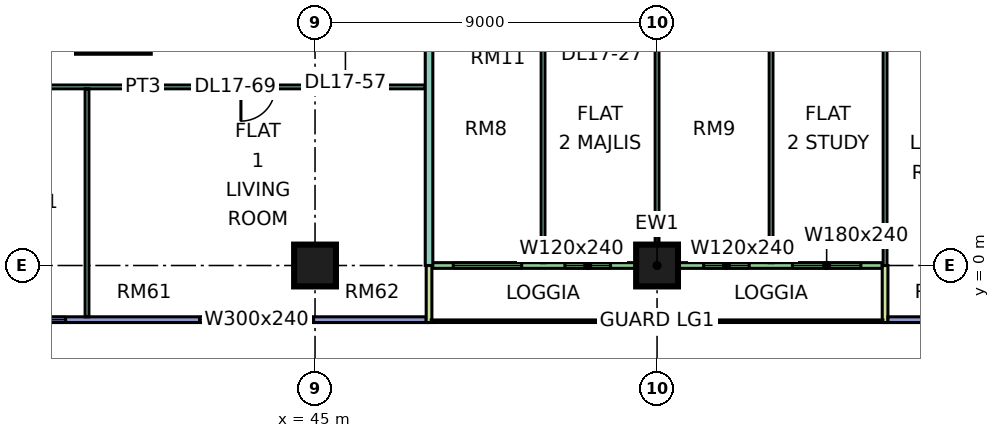
"""IFC4 building model, lengths in metres.
Left out: names, types, materials, properties, quantities, classifications, styles, units other than length and angle.
Written with IfcOpenShell. Run it as: python <this file> out.ifc"""

import sys

from ifc_helpers import new_model, si_unit, direction, frame, frame_2d, origin, origin_2d, place, context, subcontext, project, spatial, rectangle, extrude, element, fill, save


model = new_model("IFC4")
c1 = context("Model", 3, precision=1e-05, world=origin(), true_north=direction((0.0, 1.0)))
c2 = subcontext(c1, "Body", "Model", "MODEL_VIEW")
j1 = project(units=[si_unit("LENGTHUNIT", "METRE"), si_unit("PLANEANGLEUNIT", "RADIAN")], contexts=[c1])
p1 = place(None, origin())
s1 = spatial("IfcSite", under=j1, at=p1, CompositionType="ELEMENT")
p2 = place(p1, origin())
s2 = spatial("IfcBuilding", under=s1, at=p2, CompositionType="ELEMENT")
p3 = place(p2, frame((0.0, 0.0, 78.9)))
s3 = spatial("IfcBuildingStorey", under=s2, at=p3, CompositionType="ELEMENT", Elevation=78.9)
for number, where, z_axis, x_axis in (
    (1, (45.0, 0.0, 0.0), (0.0, 0.0, 1.0), (1.0, 0.0, 0.0)),
    (2, (54.0, 0.0, 0.0), (0.0, 0.0, 1.0), (1.0, 0.0, 0.0)),
):
    element("IfcColumn", number, at=place(p3, frame(where, z_axis=z_axis, x_axis=x_axis)), inside=s3, PredefinedType="COLUMN", context=c2, shape_type="SweptSolid", body=[
        extrude(rectangle(XDim=1.1, YDim=1.1, at=origin_2d()), origin(), (0.0, 0.0, 1.0), 3.75),
    ])
p4 = place(p3, frame((37.2, 5.725, 0.0), z_axis=(0.0, 0.0, 1.0), x_axis=(1.0, 0.0, 0.0)))
e3 = element("IfcWall", 3, at=p4, inside=s3, PredefinedType="SHEAR", context=c2, shape_type="SweptSolid", body=[
    extrude(rectangle(XDim=3.45, YDim=0.25, at=frame_2d((1.725, 0.0))), origin(), (0.0, 0.0, 1.0), 3.75),
])
p5 = place(p3, frame((36.075, -1.425, 0.0), z_axis=(0.0, 0.0, 1.0), x_axis=(1.0, 0.0, 0.0)))
e4 = element("IfcWall", 4, at=p5, inside=s3, PredefinedType="SOLIDWALL", context=c2, shape_type="SweptSolid", body=[
    extrude(rectangle(XDim=11.85, YDim=0.15, at=frame_2d((5.925, 0.0))), origin(), (0.0, 0.0, 1.0), 3.35),
])
p6 = place(p5, frame((0.562, 0.0, 0.45)))
e5 = element("IfcOpeningElement", 5, at=p6, cuts=e4, PredefinedType="OPENING", context=c2, shape_type="SweptSolid", body=[
    extrude(rectangle(XDim=1.8, YDim=2.4, at=frame_2d((0.9, 1.2))), frame((0.0, 0.085, 0.0), z_axis=(0.0, -1.0, 0.0), x_axis=(1.0, 0.0, 0.0)), (0.0, 0.0, 1.0), 0.17),
])
p7 = place(p5, frame((5.887, 0.0, 0.45)))
e6 = element("IfcOpeningElement", 6, at=p7, cuts=e4, PredefinedType="OPENING", context=c2, shape_type="SweptSolid", body=[
    extrude(rectangle(XDim=3.0, YDim=2.4, at=frame_2d((1.5, 1.2))), frame((0.0, 0.085, 0.0), z_axis=(0.0, -1.0, 0.0), x_axis=(1.0, 0.0, 0.0)), (0.0, 0.0, 1.0), 0.17),
])
p8 = place(p3, frame((48.075, 0.0, 0.0), z_axis=(0.0, 0.0, 1.0), x_axis=(1.0, 0.0, 0.0)))
e7 = element("IfcWall", 7, at=p8, inside=s3, PredefinedType="SOLIDWALL", context=c2, shape_type="SweptSolid", body=[
    extrude(rectangle(XDim=11.85, YDim=0.15, at=frame_2d((5.925, 0.0))), origin(), (0.0, 0.0, 1.0), 3.35),
])
p9 = place(p8, frame((0.562, 0.0, 0.45)))
e8 = element("IfcOpeningElement", 8, at=p9, cuts=e7, PredefinedType="OPENING", context=c2, shape_type="SweptSolid", body=[
    extrude(rectangle(XDim=1.8, YDim=2.4, at=frame_2d((0.9, 1.2))), frame((0.0, 0.085, 0.0), z_axis=(0.0, -1.0, 0.0), x_axis=(1.0, 0.0, 0.0)), (0.0, 0.0, 1.0), 0.17),
])
p10 = place(p8, frame((3.5, 0.0, 0.45)))
e9 = element("IfcOpeningElement", 9, at=p10, cuts=e7, PredefinedType="OPENING", context=c2, shape_type="SweptSolid", body=[
    extrude(rectangle(XDim=1.2, YDim=2.4, at=frame_2d((0.6, 1.2))), frame((0.0, 0.085, 0.0), z_axis=(0.0, -1.0, 0.0), x_axis=(1.0, 0.0, 0.0)), (0.0, 0.0, 1.0), 0.17),
])
p11 = place(p8, frame((7.15, 0.0, 0.45)))
e10 = element("IfcOpeningElement", 10, at=p11, cuts=e7, PredefinedType="OPENING", context=c2, shape_type="SweptSolid", body=[
    extrude(rectangle(XDim=1.2, YDim=2.4, at=frame_2d((0.6, 1.2))), frame((0.0, 0.085, 0.0), z_axis=(0.0, -1.0, 0.0), x_axis=(1.0, 0.0, 0.0)), (0.0, 0.0, 1.0), 0.17),
])
p12 = place(p8, frame((9.488, 0.0, 0.45)))
e11 = element("IfcOpeningElement", 11, at=p12, cuts=e7, PredefinedType="OPENING", context=c2, shape_type="SweptSolid", body=[
    extrude(rectangle(XDim=1.8, YDim=2.4, at=frame_2d((0.9, 1.2))), frame((0.0, 0.085, 0.0), z_axis=(0.0, -1.0, 0.0), x_axis=(1.0, 0.0, 0.0)), (0.0, 0.0, 1.0), 0.17),
])
for number, where, z_axis, x_axis in (
    (12, (48.0, -1.5, 0.0), (0.0, 0.0, 1.0), (0.0, 1.0, 0.0)),
    (13, (60.0, -1.5, 0.0), (0.0, 0.0, 1.0), (0.0, 1.0, 0.0)),
):
    element("IfcWall", number, at=place(p3, frame(where, z_axis=z_axis, x_axis=x_axis)), inside=s3, PredefinedType="SOLIDWALL", context=c2, shape_type="SweptSolid", body=[
        extrude(rectangle(XDim=1.5, YDim=0.15, at=frame_2d((0.75, 0.0))), origin(), (0.0, 0.0, 1.0), 3.35),
    ])
p13 = place(p3, frame((60.075, -1.425, 0.0), z_axis=(0.0, 0.0, 1.0), x_axis=(1.0, 0.0, 0.0)))
e14 = element("IfcWall", 14, at=p13, inside=s3, PredefinedType="SOLIDWALL", context=c2, shape_type="SweptSolid", body=[
    extrude(rectangle(XDim=10.425, YDim=0.15, at=frame_2d((5.212, 0.0))), origin(), (0.0, 0.0, 1.0), 3.35),
])
p14 = place(p13, frame((1.462, 0.0, 0.45)))
e15 = element("IfcOpeningElement", 15, at=p14, cuts=e14, PredefinedType="OPENING", context=c2, shape_type="SweptSolid", body=[
    extrude(rectangle(XDim=3.0, YDim=2.4, at=frame_2d((1.5, 1.2))), frame((0.0, 0.085, 0.0), z_axis=(0.0, -1.0, 0.0), x_axis=(1.0, 0.0, 0.0)), (0.0, 0.0, 1.0), 0.17),
])
p15 = place(p13, frame((6.525, 0.0, 0.45)))
e16 = element("IfcOpeningElement", 16, at=p15, cuts=e14, PredefinedType="OPENING", context=c2, shape_type="SweptSolid", body=[
    extrude(rectangle(XDim=1.8, YDim=2.4, at=frame_2d((0.9, 1.2))), frame((0.0, 0.085, 0.0), z_axis=(0.0, -1.0, 0.0), x_axis=(1.0, 0.0, 0.0)), (0.0, 0.0, 1.0), 0.17),
])
p16 = place(p13, frame((9.225, 0.0, 0.45)))
e17 = element("IfcOpeningElement", 17, at=p16, cuts=e14, PredefinedType="OPENING", context=c2, shape_type="SweptSolid", body=[
    extrude(rectangle(XDim=0.9, YDim=2.4, at=frame_2d((0.45, 1.2))), frame((0.0, 0.085, 0.0), z_axis=(0.0, -1.0, 0.0), x_axis=(1.0, 0.0, 0.0)), (0.0, 0.0, 1.0), 0.17),
])
p17 = place(p3, frame((33.05, 4.7, 0.0), z_axis=(0.0, 0.0, 1.0), x_axis=(1.0, 0.0, 0.0)))
e18 = element("IfcWall", 18, at=p17, inside=s3, PredefinedType="PARTITIONING", context=c2, shape_type="SweptSolid", body=[
    extrude(rectangle(XDim=14.85, YDim=0.1, at=frame_2d((7.425, 0.0))), origin(), (0.0, 0.0, 1.0), 3.35),
])
p18 = place(p17, frame((1.0, 0.0, 0.0)))
e19 = element("IfcOpeningElement", 19, at=p18, cuts=e18, PredefinedType="OPENING", context=c2, shape_type="SweptSolid", body=[
    extrude(rectangle(XDim=0.9, YDim=2.1, at=frame_2d((0.45, 1.05))), frame((0.0, 0.06, 0.0), z_axis=(0.0, -1.0, 0.0), x_axis=(1.0, 0.0, 0.0)), (0.0, 0.0, 1.0), 0.12),
])
p19 = place(p17, frame((4.0, 0.0, 0.0)))
e20 = element("IfcOpeningElement", 20, at=p19, cuts=e18, PredefinedType="OPENING", context=c2, shape_type="SweptSolid", body=[
    extrude(rectangle(XDim=0.9, YDim=2.1, at=frame_2d((0.45, 1.05))), frame((0.0, 0.06, 0.0), z_axis=(0.0, -1.0, 0.0), x_axis=(1.0, 0.0, 0.0)), (0.0, 0.0, 1.0), 0.12),
])
p20 = place(p17, frame((10.0, 0.0, 0.0)))
e21 = element("IfcOpeningElement", 21, at=p20, cuts=e18, PredefinedType="OPENING", context=c2, shape_type="SweptSolid", body=[
    extrude(rectangle(XDim=0.9, YDim=2.1, at=frame_2d((0.45, 1.05))), frame((0.0, 0.06, 0.0), z_axis=(0.0, -1.0, 0.0), x_axis=(1.0, 0.0, 0.0)), (0.0, 0.0, 1.0), 0.12),
])
p21 = place(p3, frame((39.0, -1.35, 0.0), z_axis=(0.0, 0.0, 1.0), x_axis=(0.0, 1.0, 0.0)))
e22 = element("IfcWall", 22, at=p21, inside=s3, PredefinedType="PARTITIONING", context=c2, shape_type="SweptSolid", body=[
    extrude(rectangle(XDim=6.0, YDim=0.1, at=frame_2d((3.0, 0.0))), origin(), (0.0, 0.0, 1.0), 3.35),
])
p22 = place(p3, frame((48.0, 0.0, 0.0), z_axis=(0.0, 0.0, 1.0), x_axis=(0.0, 1.0, 0.0)))
e23 = element("IfcWall", 23, at=p22, inside=s3, PredefinedType="PARTITIONING", context=c2, shape_type="SweptSolid", body=[
    extrude(rectangle(XDim=12.45, YDim=0.2, at=frame_2d((6.225, 0.0))), origin(), (0.0, 0.0, 1.0), 3.35),
])
for number, where, z_axis, x_axis in (
    (24, (51.0, 0.074, 0.0), (0.0, 0.0, 1.0), (0.0, 1.0, 0.0)),
    (25, (54.0, 0.074, 0.0), (0.0, 0.0, 1.0), (0.0, 1.0, 0.0)),
    (26, (57.0, 0.074, 0.0), (0.0, 0.0, 1.0), (0.0, 1.0, 0.0)),
):
    element("IfcWall", number, at=place(p3, frame(where, z_axis=z_axis, x_axis=x_axis)), inside=s3, PredefinedType="PARTITIONING", context=c2, shape_type="SweptSolid", body=[
        extrude(rectangle(XDim=7.001, YDim=0.1, at=frame_2d((3.5, 0.0))), origin(), (0.0, 0.0, 1.0), 3.35),
    ])
p23 = place(p3, frame((60.0, 0.0, 0.0), z_axis=(0.0, 0.0, 1.0), x_axis=(0.0, 1.0, 0.0)))
e27 = element("IfcWall", 27, at=p23, inside=s3, PredefinedType="PARTITIONING", context=c2, shape_type="SweptSolid", body=[
    extrude(rectangle(XDim=7.075, YDim=0.1, at=frame_2d((3.538, 0.0))), origin(), (0.0, 0.0, 1.0), 3.35),
])
p24 = place(p6, origin())
e28 = element("IfcWindow", 28, at=p24, inside=s3, PartitioningType="SINGLE_PANEL", PredefinedType="WINDOW", context=c2, shape_type="SweptSolid", body=[
    extrude(rectangle(XDim=1.8, YDim=2.4, at=frame_2d((0.9, 1.2))), frame((0.0, 0.03, 0.0), z_axis=(0.0, -1.0, 0.0), x_axis=(1.0, 0.0, 0.0)), (0.0, 0.0, 1.0), 0.06),
])
fill(e5, e28)
p25 = place(p7, origin())
e29 = element("IfcWindow", 29, at=p25, inside=s3, PartitioningType="SINGLE_PANEL", PredefinedType="WINDOW", context=c2, shape_type="SweptSolid", body=[
    extrude(rectangle(XDim=3.0, YDim=2.4, at=frame_2d((1.5, 1.2))), frame((0.0, 0.03, 0.0), z_axis=(0.0, -1.0, 0.0), x_axis=(1.0, 0.0, 0.0)), (0.0, 0.0, 1.0), 0.06),
])
fill(e6, e29)
p26 = place(p9, origin())
e30 = element("IfcWindow", 30, at=p26, inside=s3, PartitioningType="SINGLE_PANEL", PredefinedType="WINDOW", context=c2, shape_type="SweptSolid", body=[
    extrude(rectangle(XDim=1.8, YDim=2.4, at=frame_2d((0.9, 1.2))), frame((0.0, 0.03, 0.0), z_axis=(0.0, -1.0, 0.0), x_axis=(1.0, 0.0, 0.0)), (0.0, 0.0, 1.0), 0.06),
])
fill(e8, e30)
p27 = place(p10, origin())
e31 = element("IfcWindow", 31, at=p27, inside=s3, PartitioningType="SINGLE_PANEL", PredefinedType="WINDOW", context=c2, shape_type="SweptSolid", body=[
    extrude(rectangle(XDim=1.2, YDim=2.4, at=frame_2d((0.6, 1.2))), frame((0.0, 0.03, 0.0), z_axis=(0.0, -1.0, 0.0), x_axis=(1.0, 0.0, 0.0)), (0.0, 0.0, 1.0), 0.06),
])
fill(e9, e31)
p28 = place(p11, origin())
e32 = element("IfcWindow", 32, at=p28, inside=s3, PartitioningType="SINGLE_PANEL", PredefinedType="WINDOW", context=c2, shape_type="SweptSolid", body=[
    extrude(rectangle(XDim=1.2, YDim=2.4, at=frame_2d((0.6, 1.2))), frame((0.0, 0.03, 0.0), z_axis=(0.0, -1.0, 0.0), x_axis=(1.0, 0.0, 0.0)), (0.0, 0.0, 1.0), 0.06),
])
fill(e10, e32)
p29 = place(p12, origin())
e33 = element("IfcWindow", 33, at=p29, inside=s3, PartitioningType="SINGLE_PANEL", PredefinedType="WINDOW", context=c2, shape_type="SweptSolid", body=[
    extrude(rectangle(XDim=1.8, YDim=2.4, at=frame_2d((0.9, 1.2))), frame((0.0, 0.03, 0.0), z_axis=(0.0, -1.0, 0.0), x_axis=(1.0, 0.0, 0.0)), (0.0, 0.0, 1.0), 0.06),
])
fill(e11, e33)
p30 = place(p20, frame((0.9, 0.0, 0.0), z_axis=(0.0, 0.0, 1.0), x_axis=(-1.0, 0.0, 0.0)))
e34 = element("IfcDoor", 34, at=p30, inside=s3, OperationType="SINGLE_SWING_LEFT", PredefinedType="DOOR", context=c2, shape_type="SweptSolid", body=[
    extrude(rectangle(XDim=0.9, YDim=2.1, at=frame_2d((0.45, 1.05))), frame((0.0, 0.025, 0.0), z_axis=(0.0, -1.0, 0.0), x_axis=(1.0, 0.0, 0.0)), (0.0, 0.0, 1.0), 0.05),
])
fill(e21, e34)
save(model, sys.argv[1])
